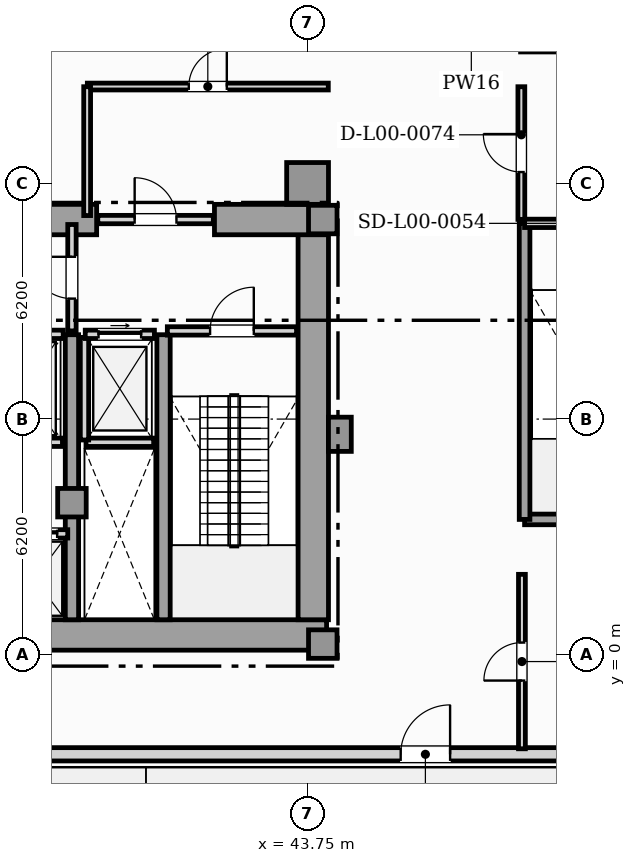
"""IFC4 building model, lengths in metres.
Left out: names, types, materials, properties, quantities, classifications, styles, units other than length and angle.
Written with IfcOpenShell. Run it as: python <this file> out.ifc"""

import sys

from ifc_helpers import new_model, si_unit, direction, frame, frame_2d, origin, origin_2d, place, context, subcontext, project, spatial, rectangle, extrude, element, fill, save


model = new_model("IFC4")
c1 = context("Model", 3, precision=1e-05, world=origin(), true_north=direction((0.0, 1.0)))
c2 = subcontext(c1, "Body", "Model", "MODEL_VIEW")
j1 = project(units=[si_unit("LENGTHUNIT", "METRE"), si_unit("PLANEANGLEUNIT", "RADIAN")], contexts=[c1])
p1 = place(None, origin())
s1 = spatial("IfcSite", under=j1, at=p1, CompositionType="ELEMENT")
p2 = place(p1, origin())
s2 = spatial("IfcBuilding", under=s1, at=p2, CompositionType="ELEMENT")
p3 = place(p2, origin())
s3 = spatial("IfcBuildingStorey", under=s2, at=p3, CompositionType="ELEMENT", Elevation=0.0)
p4 = place(p3, frame((32.08, 0.52, 0.0), z_axis=(0.0, 0.0, 1.0), x_axis=(1.0, 0.0, 0.0)))
e1 = element("IfcWall", 1, at=p4, inside=s3, PredefinedType="SHEAR", context=c2, shape_type="SweptSolid", body=[
    extrude(rectangle(XDim=12.17, YDim=0.8, at=frame_2d((6.085, 0.0))), origin(), (0.0, 0.0, 1.0), 5.1),
])
p5 = place(p3, frame((43.9, 0.92, 0.0), z_axis=(0.0, 0.0, 1.0), x_axis=(0.0, 1.0, 0.0)))
e2 = element("IfcWall", 2, at=p5, inside=s3, PredefinedType="SHEAR", context=c2, shape_type="SweptSolid", body=[
    extrude(rectangle(XDim=10.53, YDim=0.8, at=frame_2d((5.265, 0.0))), origin(), (0.0, 0.0, 1.0), 5.1),
])
p6 = place(p3, frame((30.9, 11.45, 0.0), z_axis=(0.0, 0.0, 1.0), x_axis=(1.0, 0.0, 0.0)))
e3 = element("IfcWall", 3, at=p6, inside=s3, PredefinedType="SHEAR", context=c2, shape_type="SweptSolid", body=[
    extrude(rectangle(XDim=7.3, YDim=0.8, at=frame_2d((3.65, 0.0))), origin(), (0.0, 0.0, 1.0), 5.1),
])
p7 = place(p3, frame((41.3, 11.45, 0.0), z_axis=(0.0, 0.0, 1.0), x_axis=(1.0, 0.0, 0.0)))
e4 = element("IfcWall", 4, at=p7, inside=s3, PredefinedType="SHEAR", context=c2, shape_type="SweptSolid", body=[
    extrude(rectangle(XDim=2.95, YDim=0.8, at=frame_2d((1.475, 0.0))), origin(), (0.0, 0.0, 1.0), 5.1),
])
for number, where, z_axis, x_axis in (
    (5, (37.55, 0.92, 0.0), (0.0, 0.0, 1.0), (0.0, 1.0, 0.0)),
    (6, (39.96, 0.92, 0.0), (0.0, 0.0, 1.0), (0.0, 1.0, 0.0)),
):
    element("IfcWall", number, at=place(p3, frame(where, z_axis=z_axis, x_axis=x_axis)), inside=s3, PredefinedType="SHEAR", context=c2, shape_type="SweptSolid", body=[
        extrude(rectangle(XDim=7.5, YDim=0.35, at=frame_2d((3.75, 0.0))), origin(), (0.0, 0.0, 1.0), 5.1),
    ])
p8 = place(p3, frame((44.6, 5.8, 0.0), z_axis=(0.0, 0.0, 1.0), x_axis=(1.0, 0.0, 0.0)))
e7 = element("IfcColumn", 7, at=p8, inside=s3, PredefinedType="PILASTER", context=c2, shape_type="SweptSolid", body=[
    extrude(rectangle(XDim=0.6, YDim=0.9, at=origin_2d()), origin(), (0.0, 0.0, 1.0), 5.4),
])
for number, where, z_axis, x_axis in (
    (8, (44.15, 0.28, 0.0), (0.0, 0.0, 1.0), (1.0, 0.0, 0.0)),
    (9, (44.15, 11.45, 0.0), (0.0, 0.0, 1.0), (1.0, 0.0, 0.0)),
    (10, (37.55, 4.0, 0.0), (0.0, 0.0, 1.0), (1.0, 0.0, 0.0)),
):
    element("IfcColumn", number, at=place(p3, frame(where, z_axis=z_axis, x_axis=x_axis)), inside=s3, PredefinedType="COLUMN", context=c2, shape_type="SweptSolid", body=[
        extrude(rectangle(XDim=0.75, YDim=0.75, at=origin_2d()), origin(), (0.0, 0.0, 1.0), 5.4),
    ])
p9 = place(p3, frame((43.75, 12.4, 0.0), z_axis=(0.0, 0.0, 1.0), x_axis=(1.0, 0.0, 0.0)))
e11 = element("IfcColumn", 11, at=p9, inside=s3, PredefinedType="COLUMN", context=c2, shape_type="SweptSolid", body=[
    extrude(rectangle(XDim=1.1, YDim=1.1, at=origin_2d()), origin(), (0.0, 0.0, 1.0), 5.4),
])
p10 = place(p3, frame((-8.06, -2.62, 0.0), z_axis=(0.0, 0.0, 1.0), x_axis=(1.0, 0.0, 0.0)))
e12 = element("IfcWall", 12, at=p10, inside=s3, PredefinedType="SOLIDWALL", context=c2, shape_type="SweptSolid", body=[
    extrude(rectangle(XDim=71.97, YDim=0.35, at=frame_2d((35.985, 0.0))), origin(), (0.0, 0.0, 1.0), 5.1),
])
p11 = place(p10, frame((18.06, 0.0, 0.0)))
e13 = element("IfcOpeningElement", 13, at=p11, cuts=e12, PredefinedType="OPENING", context=c2, shape_type="SweptSolid", body=[
    extrude(rectangle(XDim=1.3, YDim=2.2, at=frame_2d((0.65, 1.1))), frame((0.0, 0.185, 0.0), z_axis=(0.0, -1.0, 0.0), x_axis=(1.0, 0.0, 0.0)), (0.0, 0.0, 1.0), 0.37),
])
p12 = place(p10, frame((39.91, 0.0, 0.0)))
e14 = element("IfcOpeningElement", 14, at=p12, cuts=e12, PredefinedType="OPENING", context=c2, shape_type="SweptSolid", body=[
    extrude(rectangle(XDim=1.3, YDim=2.2, at=frame_2d((0.65, 1.1))), frame((0.0, 0.185, 0.0), z_axis=(0.0, -1.0, 0.0), x_axis=(1.0, 0.0, 0.0)), (0.0, 0.0, 1.0), 0.37),
])
p13 = place(p10, frame((54.26, 0.0, 0.0)))
e15 = element("IfcOpeningElement", 15, at=p13, cuts=e12, PredefinedType="OPENING", context=c2, shape_type="SweptSolid", body=[
    extrude(rectangle(XDim=1.3, YDim=2.2, at=frame_2d((0.65, 1.1))), frame((0.0, 0.185, 0.0), z_axis=(0.0, -1.0, 0.0), x_axis=(1.0, 0.0, 0.0)), (0.0, 0.0, 1.0), 0.37),
])
p14 = place(p10, frame((66.76, 0.0, 0.0)))
e16 = element("IfcOpeningElement", 16, at=p14, cuts=e12, PredefinedType="OPENING", context=c2, shape_type="SweptSolid", body=[
    extrude(rectangle(XDim=3.6, YDim=3.2, at=frame_2d((1.8, 1.6))), frame((0.0, 0.185, 0.0), z_axis=(0.0, -1.0, 0.0), x_axis=(1.0, 0.0, 0.0)), (0.0, 0.0, 1.0), 0.37),
])
p15 = place(p10, frame((64.92, 0.0, 0.0)))
e17 = element("IfcOpeningElement", 17, at=p15, cuts=e12, PredefinedType="OPENING", context=c2, shape_type="SweptSolid", body=[
    extrude(rectangle(XDim=1.08, YDim=2.25, at=frame_2d((0.54, 1.125))), frame((0.0, 0.185, 0.0), z_axis=(0.0, -1.0, 0.0), x_axis=(1.0, 0.0, 0.0)), (0.0, 0.0, 1.0), 0.37),
])
p16 = place(p3, frame((37.92, 5.59, 0.0), z_axis=(0.0, 0.0, 1.0), x_axis=(1.0, 0.0, 0.0)))
e18 = element("IfcWall", 18, at=p16, inside=s3, PredefinedType="SOLIDWALL", context=c2, shape_type="SweptSolid", body=[
    extrude(rectangle(XDim=1.78, YDim=0.22, at=frame_2d((0.89, 0.0))), origin(), (0.0, 0.0, 1.0), 5.1),
])
p17 = place(p3, frame((37.88, 5.65, 0.0), z_axis=(0.0, 0.0, 1.0), x_axis=(0.0, 1.0, 0.0)))
e19 = element("IfcWall", 19, at=p17, inside=s3, PredefinedType="SOLIDWALL", context=c2, shape_type="SweptSolid", body=[
    extrude(rectangle(XDim=2.7, YDim=0.22, at=frame_2d((1.35, 0.0))), origin(), (0.0, 0.0, 1.0), 5.1),
])
p18 = place(p3, frame((37.9, 8.43, 0.0), z_axis=(0.0, 0.0, 1.0), x_axis=(1.0, 0.0, 0.0)))
e20 = element("IfcWall", 20, at=p18, inside=s3, PredefinedType="SOLIDWALL", context=c2, shape_type="SweptSolid", body=[
    extrude(rectangle(XDim=1.82, YDim=0.22, at=frame_2d((0.91, 0.0))), origin(), (0.0, 0.0, 1.0), 5.1),
])
p19 = place(p18, frame((0.35, 0.0, 0.0)))
e21 = element("IfcOpeningElement", 21, at=p19, cuts=e20, PredefinedType="OPENING", context=c2, shape_type="SweptSolid", body=[
    extrude(rectangle(XDim=1.12, YDim=2.25, at=frame_2d((0.56, 1.125))), frame((0.0, 0.12, 0.0), z_axis=(0.0, -1.0, 0.0), x_axis=(1.0, 0.0, 0.0)), (0.0, 0.0, 1.0), 0.24),
])
p20 = place(p3, frame((35.3, 5.59, 0.0), z_axis=(0.0, 0.0, 1.0), x_axis=(1.0, 0.0, 0.0)))
e22 = element("IfcWall", 22, at=p20, inside=s3, PredefinedType="SOLIDWALL", context=c2, shape_type="SweptSolid", body=[
    extrude(rectangle(XDim=2.0, YDim=0.22, at=frame_2d((1.0, 0.0))), origin(), (0.0, 0.0, 1.0), 5.1),
])
p21 = place(p3, frame((35.28, 8.43, 0.0), z_axis=(0.0, 0.0, 1.0), x_axis=(1.0, 0.0, 0.0)))
e23 = element("IfcWall", 23, at=p21, inside=s3, PredefinedType="SOLIDWALL", context=c2, shape_type="SweptSolid", body=[
    extrude(rectangle(XDim=2.04, YDim=0.22, at=frame_2d((1.02, 0.0))), origin(), (0.0, 0.0, 1.0), 5.1),
])
p22 = place(p21, frame((0.43, 0.0, 0.0)))
e24 = element("IfcOpeningElement", 24, at=p22, cuts=e23, PredefinedType="OPENING", context=c2, shape_type="SweptSolid", body=[
    extrude(rectangle(XDim=1.18, YDim=2.2, at=frame_2d((0.59, 1.1))), frame((0.0, 0.12, 0.0), z_axis=(0.0, -1.0, 0.0), x_axis=(1.0, 0.0, 0.0)), (0.0, 0.0, 1.0), 0.24),
])
p23 = place(p3, frame((35.7, 3.18, 0.0), z_axis=(0.0, 0.0, 1.0), x_axis=(1.0, 0.0, 0.0)))
e25 = element("IfcWall", 25, at=p23, inside=s3, PredefinedType="SOLIDWALL", context=c2, shape_type="SweptSolid", body=[
    extrude(rectangle(XDim=1.74, YDim=0.22, at=frame_2d((0.87, 0.0))), origin(), (0.0, 0.0, 1.0), 5.1),
])
p24 = place(p23, frame((0.28, 0.0, 0.0)))
e26 = element("IfcOpeningElement", 26, at=p24, cuts=e25, PredefinedType="OPENING", context=c2, shape_type="SweptSolid", body=[
    extrude(rectangle(XDim=1.18, YDim=2.2, at=frame_2d((0.59, 1.1))), frame((0.0, 0.12, 0.0), z_axis=(0.0, -1.0, 0.0), x_axis=(1.0, 0.0, 0.0)), (0.0, 0.0, 1.0), 0.24),
])
p25 = place(p3, frame((40.06, 8.52, 0.0), z_axis=(0.0, 0.0, 1.0), x_axis=(1.0, 0.0, 0.0)))
e27 = element("IfcWall", 27, at=p25, inside=s3, PredefinedType="SOLIDWALL", context=c2, shape_type="SweptSolid", body=[
    extrude(rectangle(XDim=3.4, YDim=0.22, at=frame_2d((1.7, 0.0))), origin(), (0.0, 0.0, 1.0), 5.1),
])
p26 = place(p25, frame((1.125, 0.0, 0.0)))
e28 = element("IfcOpeningElement", 28, at=p26, cuts=e27, PredefinedType="OPENING", context=c2, shape_type="SweptSolid", body=[
    extrude(rectangle(XDim=1.15, YDim=2.2, at=frame_2d((0.575, 1.1))), frame((0.0, 0.12, 0.0), z_axis=(0.0, -1.0, 0.0), x_axis=(1.0, 0.0, 0.0)), (0.0, 0.0, 1.0), 0.24),
])
p27 = place(p3, frame((49.46, 3.56, 0.0), z_axis=(0.0, 0.0, 1.0), x_axis=(1.0, 0.0, 0.0)))
e29 = element("IfcWall", 29, at=p27, inside=s3, PredefinedType="SHEAR", context=c2, shape_type="SweptSolid", body=[
    extrude(rectangle(XDim=3.68, YDim=0.28, at=frame_2d((1.84, 0.0))), origin(), (0.0, 0.0, 1.0), 5.1),
])
p28 = place(p3, frame((49.46, 3.56, 0.0), z_axis=(0.0, 0.0, 1.0), x_axis=(0.0, 1.0, 0.0)))
e30 = element("IfcWall", 30, at=p28, inside=s3, PredefinedType="SHEAR", context=c2, shape_type="SweptSolid", body=[
    extrude(rectangle(XDim=7.79, YDim=0.28, at=frame_2d((3.895, 0.0))), origin(), (0.0, 0.0, 1.0), 5.1),
])
p29 = place(p3, frame((49.46, 11.35, 0.0), z_axis=(0.0, 0.0, 1.0), x_axis=(1.0, 0.0, 0.0)))
e31 = element("IfcWall", 31, at=p29, inside=s3, PredefinedType="SOLIDWALL", context=c2, shape_type="SweptSolid", body=[
    extrude(rectangle(XDim=3.68, YDim=0.22, at=frame_2d((1.84, 0.0))), origin(), (0.0, 0.0, 1.0), 5.1),
])
p30 = place(p29, frame((1.265, 0.0, 0.0)))
e32 = element("IfcOpeningElement", 32, at=p30, cuts=e31, PredefinedType="OPENING", context=c2, shape_type="SweptSolid", body=[
    extrude(rectangle(XDim=1.15, YDim=2.2, at=frame_2d((0.575, 1.1))), frame((0.0, 0.12, 0.0), z_axis=(0.0, -1.0, 0.0), x_axis=(1.0, 0.0, 0.0)), (0.0, 0.0, 1.0), 0.24),
])
p31 = place(p3, frame((37.55, 8.52, 0.0), z_axis=(0.0, 0.0, 1.0), x_axis=(0.0, 1.0, 0.0)))
e33 = element("IfcWall", 33, at=p31, inside=s3, PredefinedType="SOLIDWALL", context=c2, shape_type="SweptSolid", body=[
    extrude(rectangle(XDim=2.8, YDim=0.22, at=frame_2d((1.4, 0.0))), origin(), (0.0, 0.0, 1.0), 4.555),
])
p32 = place(p31, frame((0.85, 0.0, 0.0)))
e34 = element("IfcOpeningElement", 34, at=p32, cuts=e33, PredefinedType="OPENING", context=c2, shape_type="SweptSolid", body=[
    extrude(rectangle(XDim=1.1, YDim=2.2, at=frame_2d((0.55, 1.1))), frame((0.0, 0.12, 0.0), z_axis=(0.0, -1.0, 0.0), x_axis=(1.0, 0.0, 0.0)), (0.0, 0.0, 1.0), 0.24),
])
p33 = place(p3, frame((38.23, 11.45, 0.0), z_axis=(0.0, 0.0, 1.0), x_axis=(1.0, 0.0, 0.0)))
e35 = element("IfcWall", 35, at=p33, inside=s3, PredefinedType="SOLIDWALL", context=c2, shape_type="SweptSolid", body=[
    extrude(rectangle(XDim=3.04, YDim=0.22, at=frame_2d((1.52, 0.0))), origin(), (0.0, 0.0, 1.0), 5.1),
])
p34 = place(p33, frame((0.97, 0.0, 0.0)))
e36 = element("IfcOpeningElement", 36, at=p34, cuts=e35, PredefinedType="OPENING", context=c2, shape_type="SweptSolid", body=[
    extrude(rectangle(XDim=1.1, YDim=2.2, at=frame_2d((0.55, 1.1))), frame((0.0, 0.12, 0.0), z_axis=(0.0, -1.0, 0.0), x_axis=(1.0, 0.0, 0.0)), (0.0, 0.0, 1.0), 0.24),
])
p35 = place(p3, frame((37.955, 14.95, 0.0), z_axis=(0.0, 0.0, 1.0), x_axis=(1.0, 0.0, 0.0)))
e37 = element("IfcWall", 37, at=p35, inside=s3, PredefinedType="PARTITIONING", context=c2, shape_type="SweptSolid", body=[
    extrude(rectangle(XDim=6.34, YDim=0.18, at=frame_2d((3.17, 0.0))), origin(), (0.0, 0.0, 1.0), 5.1),
])
p36 = place(p35, frame((2.67, 0.0, 0.0)))
e38 = element("IfcOpeningElement", 38, at=p36, cuts=e37, PredefinedType="OPENING", context=c2, shape_type="SweptSolid", body=[
    extrude(rectangle(XDim=1.0, YDim=2.15, at=frame_2d((0.5, 1.075))), frame((0.0, 0.1, 0.0), z_axis=(0.0, -1.0, 0.0), x_axis=(1.0, 0.0, 0.0)), (0.0, 0.0, 1.0), 0.2),
])
p37 = place(p3, frame((37.95, 11.555, 0.0), z_axis=(0.0, 0.0, 1.0), x_axis=(0.0, 1.0, 0.0)))
e39 = element("IfcWall", 39, at=p37, inside=s3, PredefinedType="PARTITIONING", context=c2, shape_type="SweptSolid", body=[
    extrude(rectangle(XDim=3.39, YDim=0.18, at=frame_2d((1.695, 0.0))), origin(), (0.0, 0.0, 1.0), 5.1),
])
p38 = place(p3, frame((49.39, -2.475, 0.0), z_axis=(0.0, 0.0, 1.0), x_axis=(0.0, 1.0, 0.0)))
e40 = element("IfcWall", 40, at=p38, inside=s3, PredefinedType="PARTITIONING", context=c2, shape_type="SweptSolid", body=[
    extrude(rectangle(XDim=4.59, YDim=0.18, at=frame_2d((2.295, 0.0))), origin(), (0.0, 0.0, 1.0), 5.1),
])
p39 = place(p38, frame((1.795, 0.0, 0.0)))
e41 = element("IfcOpeningElement", 41, at=p39, cuts=e40, PredefinedType="OPENING", context=c2, shape_type="SweptSolid", body=[
    extrude(rectangle(XDim=1.0, YDim=2.15, at=frame_2d((0.5, 1.075))), frame((0.0, 0.1, 0.0), z_axis=(0.0, -1.0, 0.0), x_axis=(1.0, 0.0, 0.0)), (0.0, 0.0, 1.0), 0.2),
])
p40 = place(p3, frame((49.375, 11.455, 0.0), z_axis=(0.0, 0.0, 1.0), x_axis=(0.0, 1.0, 0.0)))
e42 = element("IfcWall", 42, at=p40, inside=s3, PredefinedType="PARTITIONING", context=c2, shape_type="SweptSolid", body=[
    extrude(rectangle(XDim=3.49, YDim=0.18, at=frame_2d((1.745, 0.0))), origin(), (0.0, 0.0, 1.0), 5.1),
])
p41 = place(p40, frame((1.245, 0.0, 0.0)))
e43 = element("IfcOpeningElement", 43, at=p41, cuts=e42, PredefinedType="OPENING", context=c2, shape_type="SweptSolid", body=[
    extrude(rectangle(XDim=1.0, YDim=2.15, at=frame_2d((0.5, 1.075))), frame((0.0, 0.1, 0.0), z_axis=(0.0, -1.0, 0.0), x_axis=(1.0, 0.0, 0.0)), (0.0, 0.0, 1.0), 0.2),
])
p42 = place(p13, frame((1.3, 0.0, 0.0), z_axis=(0.0, 0.0, 1.0), x_axis=(-1.0, 0.0, 0.0)))
e44 = element("IfcDoor", 44, at=p42, inside=s3, OperationType="SINGLE_SWING_LEFT", PredefinedType="DOOR", context=c2, shape_type="SweptSolid", body=[
    extrude(rectangle(XDim=1.3, YDim=2.2, at=frame_2d((0.65, 1.1))), frame((0.0, 0.025, 0.0), z_axis=(0.0, -1.0, 0.0), x_axis=(1.0, 0.0, 0.0)), (0.0, 0.0, 1.0), 0.05),
])
fill(e15, e44)
p43 = place(p19, origin())
e45 = element("IfcDoor", 45, at=p43, inside=s3, OperationType="SLIDING_TO_RIGHT", PredefinedType="DOOR", context=c2, shape_type="SweptSolid", body=[
    extrude(rectangle(XDim=1.12, YDim=2.25, at=frame_2d((0.56, 1.125))), frame((0.0, 0.025, 0.0), z_axis=(0.0, -1.0, 0.0), x_axis=(1.0, 0.0, 0.0)), (0.0, 0.0, 1.0), 0.05),
])
fill(e21, e45)
p44 = place(p24, origin())
e46 = element("IfcDoor", 46, at=p44, inside=s3, OperationType="SLIDING_TO_LEFT", PredefinedType="DOOR", context=c2, shape_type="SweptSolid", body=[
    extrude(rectangle(XDim=1.18, YDim=2.2, at=frame_2d((0.59, 1.1))), frame((0.0, 0.025, 0.0), z_axis=(0.0, -1.0, 0.0), x_axis=(1.0, 0.0, 0.0)), (0.0, 0.0, 1.0), 0.05),
])
fill(e26, e46)
p45 = place(p26, origin())
e47 = element("IfcDoor", 47, at=p45, inside=s3, OperationType="SINGLE_SWING_RIGHT", PredefinedType="DOOR", context=c2, shape_type="SweptSolid", body=[
    extrude(rectangle(XDim=1.15, YDim=2.2, at=frame_2d((0.575, 1.1))), frame((0.0, 0.025, 0.0), z_axis=(0.0, -1.0, 0.0), x_axis=(1.0, 0.0, 0.0)), (0.0, 0.0, 1.0), 0.05),
])
fill(e28, e47)
p46 = place(p32, origin())
e48 = element("IfcDoor", 48, at=p46, inside=s3, OperationType="SINGLE_SWING_RIGHT", PredefinedType="DOOR", context=c2, shape_type="SweptSolid", body=[
    extrude(rectangle(XDim=1.1, YDim=2.2, at=frame_2d((0.55, 1.1))), frame((0.0, 0.025, 0.0), z_axis=(0.0, -1.0, 0.0), x_axis=(1.0, 0.0, 0.0)), (0.0, 0.0, 1.0), 0.05),
])
fill(e34, e48)
p47 = place(p34, origin())
e49 = element("IfcDoor", 49, at=p47, inside=s3, OperationType="SINGLE_SWING_LEFT", PredefinedType="DOOR", context=c2, shape_type="SweptSolid", body=[
    extrude(rectangle(XDim=1.1, YDim=2.2, at=frame_2d((0.55, 1.1))), frame((0.0, 0.025, 0.0), z_axis=(0.0, -1.0, 0.0), x_axis=(1.0, 0.0, 0.0)), (0.0, 0.0, 1.0), 0.05),
])
fill(e36, e49)
p48 = place(p36, origin())
e50 = element("IfcDoor", 50, at=p48, inside=s3, OperationType="SINGLE_SWING_RIGHT", PredefinedType="DOOR", context=c2, shape_type="SweptSolid", body=[
    extrude(rectangle(XDim=1.0, YDim=2.15, at=frame_2d((0.5, 1.075))), frame((0.0, 0.025, 0.0), z_axis=(0.0, -1.0, 0.0), x_axis=(1.0, 0.0, 0.0)), (0.0, 0.0, 1.0), 0.05),
])
fill(e38, e50)
p49 = place(p39, origin())
e51 = element("IfcDoor", 51, at=p49, inside=s3, OperationType="SINGLE_SWING_LEFT", PredefinedType="DOOR", context=c2, shape_type="SweptSolid", body=[
    extrude(rectangle(XDim=1.0, YDim=2.15, at=frame_2d((0.5, 1.075))), frame((0.0, 0.025, 0.0), z_axis=(0.0, -1.0, 0.0), x_axis=(1.0, 0.0, 0.0)), (0.0, 0.0, 1.0), 0.05),
])
fill(e41, e51)
p50 = place(p41, origin())
e52 = element("IfcDoor", 52, at=p50, inside=s3, OperationType="SINGLE_SWING_RIGHT", PredefinedType="DOOR", context=c2, shape_type="SweptSolid", body=[
    extrude(rectangle(XDim=1.0, YDim=2.15, at=frame_2d((0.5, 1.075))), frame((0.0, 0.025, 0.0), z_axis=(0.0, -1.0, 0.0), x_axis=(1.0, 0.0, 0.0)), (0.0, 0.0, 1.0), 0.05),
])
fill(e43, e52)
save(model, sys.argv[1])
